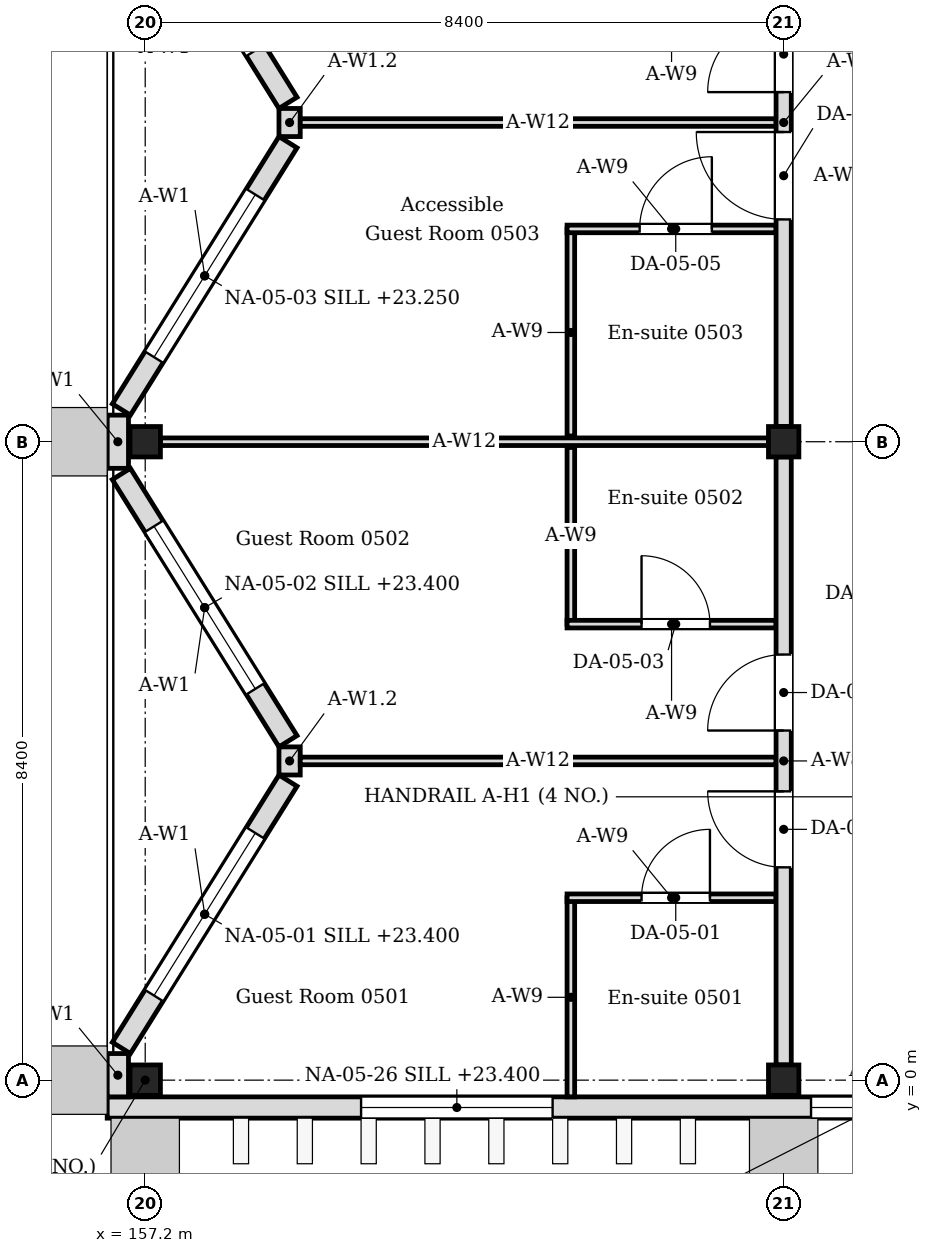
"""IFC4 building model, lengths in metres.
Left out: names, types, materials, properties, quantities, classifications, styles, units other than length and angle.
Written with IfcOpenShell. Run it as: python <this file> out.ifc"""

import sys

from ifc_helpers import new_model, si_unit, direction, frame, frame_2d, origin, origin_2d, place, context, subcontext, project, spatial, rectangle, i_section, extrude, element, fill, save


model = new_model("IFC4")
c1 = context("Model", 3, precision=1e-05, world=origin(), true_north=direction((0.0, 1.0)))
c2 = subcontext(c1, "Body", "Model", "MODEL_VIEW")
j1 = project(units=[si_unit("LENGTHUNIT", "METRE"), si_unit("PLANEANGLEUNIT", "RADIAN")], contexts=[c1])
p1 = place(None, origin())
s1 = spatial("IfcSite", under=j1, at=p1, CompositionType="ELEMENT")
p2 = place(p1, origin())
s2 = spatial("IfcBuilding", under=s1, at=p2, CompositionType="ELEMENT")
p3 = place(p2, frame((0.0, 0.0, 22.8)))
s3 = spatial("IfcBuildingStorey", under=s2, at=p3, CompositionType="ELEMENT", Elevation=22.8)
for number, where, z_axis, x_axis in (
    (1, (157.2, 0.0, 0.0), (0.0, 0.0, 1.0), (1.0, 0.0, 0.0)),
    (2, (157.2, 8.4, 0.0), (0.0, 0.0, 1.0), (1.0, 0.0, 0.0)),
    (3, (165.6, 0.0, 0.0), (0.0, 0.0, 1.0), (1.0, 0.0, 0.0)),
    (4, (165.6, 8.4, 0.0), (0.0, 0.0, 1.0), (1.0, 0.0, 0.0)),
):
    element("IfcColumn", number, at=place(p3, frame(where, z_axis=z_axis, x_axis=x_axis)), inside=s3, PredefinedType="COLUMN", context=c2, shape_type="SweptSolid", body=[
        extrude(i_section(OverallWidth=0.4, OverallDepth=0.4, WebThickness=0.013, FlangeThickness=0.021, FilletRadius=0.022, at=origin_2d()), origin(), (0.0, 0.0, 1.0), 4.2),
    ])
p4 = place(p3, frame((156.84, -0.22, 0.0), z_axis=(0.0, 0.0, 1.0), x_axis=(0.0, 1.0, 0.0)))
e5 = element("IfcWall", 5, at=p4, inside=s3, PredefinedType="SOLIDWALL", context=c2, shape_type="SweptSolid", body=[
    extrude(rectangle(XDim=0.57, YDim=0.28, at=frame_2d((0.285, 0.0))), origin(), (0.0, 0.0, 1.0), 4.05),
])
p5 = place(p3, frame((156.886, 0.424, 0.0), z_axis=(0.0, 0.0, 1.0), x_axis=(0.529018946142, 0.848610013271, 0.0)))
e6 = element("IfcWall", 6, at=p5, inside=s3, PredefinedType="SOLIDWALL", context=c2, shape_type="SweptSolid", body=[
    extrude(rectangle(XDim=4.144, YDim=0.28, at=frame_2d((2.072, 0.0))), origin(), (0.0, 0.0, 1.0), 4.05),
])
p6 = place(p5, frame((0.812, 0.0, 0.6)))
e7 = element("IfcOpeningElement", 7, at=p6, cuts=e6, PredefinedType="OPENING", context=c2, shape_type="SweptSolid", body=[
    extrude(rectangle(XDim=2.52, YDim=2.4, at=frame_2d((1.26, 1.2))), frame((0.0, 0.15, 0.0), z_axis=(0.0, -1.0, 0.0), x_axis=(1.0, 0.0, 0.0)), (0.0, 0.0, 1.0), 0.3),
])
p7 = place(p3, frame((159.079, 4.459, 0.0), z_axis=(0.0, 0.0, 1.0), x_axis=(-0.529018946142, 0.848610013271, 0.0)))
e8 = element("IfcWall", 8, at=p7, inside=s3, PredefinedType="SOLIDWALL", context=c2, shape_type="SweptSolid", body=[
    extrude(rectangle(XDim=4.144, YDim=0.28, at=frame_2d((2.072, 0.0))), origin(), (0.0, 0.0, 1.0), 4.05),
])
p8 = place(p7, frame((0.812, 0.0, 0.6)))
e9 = element("IfcOpeningElement", 9, at=p8, cuts=e8, PredefinedType="OPENING", context=c2, shape_type="SweptSolid", body=[
    extrude(rectangle(XDim=2.52, YDim=2.4, at=frame_2d((1.26, 1.2))), frame((0.0, 0.15, 0.0), z_axis=(0.0, -1.0, 0.0), x_axis=(1.0, 0.0, 0.0)), (0.0, 0.0, 1.0), 0.3),
])
p9 = place(p3, frame((159.1, 4.015, 0.0), z_axis=(0.0, 0.0, 1.0), x_axis=(0.0, 1.0, 0.0)))
e10 = element("IfcWall", 10, at=p9, inside=s3, PredefinedType="SOLIDWALL", context=c2, shape_type="SweptSolid", body=[
    extrude(rectangle(XDim=0.37, YDim=0.28, at=frame_2d((0.185, 0.0))), origin(), (0.0, 0.0, 1.0), 3.604),
])
p10 = place(p3, frame((156.84, 8.05, 0.0), z_axis=(0.0, 0.0, 1.0), x_axis=(0.0, 1.0, 0.0)))
e11 = element("IfcWall", 11, at=p10, inside=s3, PredefinedType="SOLIDWALL", context=c2, shape_type="SweptSolid", body=[
    extrude(rectangle(XDim=0.7, YDim=0.28, at=frame_2d((0.35, 0.0))), origin(), (0.0, 0.0, 1.0), 4.05),
])
p11 = place(p3, frame((156.886, 8.824, 0.0), z_axis=(0.0, 0.0, 1.0), x_axis=(0.529018946142, 0.848610013271, 0.0)))
e12 = element("IfcWall", 12, at=p11, inside=s3, PredefinedType="SOLIDWALL", context=c2, shape_type="SweptSolid", body=[
    extrude(rectangle(XDim=4.144, YDim=0.28, at=frame_2d((2.072, 0.0))), origin(), (0.0, 0.0, 1.0), 4.05),
])
p12 = place(p11, frame((0.812, 0.0, 0.45)))
e13 = element("IfcOpeningElement", 13, at=p12, cuts=e12, PredefinedType="OPENING", context=c2, shape_type="SweptSolid", body=[
    extrude(rectangle(XDim=2.52, YDim=2.1, at=frame_2d((1.26, 1.05))), frame((0.0, 0.15, 0.0), z_axis=(0.0, -1.0, 0.0), x_axis=(1.0, 0.0, 0.0)), (0.0, 0.0, 1.0), 0.3),
])
p13 = place(p3, frame((159.079, 12.859, 0.0), z_axis=(0.0, 0.0, 1.0), x_axis=(-0.528992500338, 0.848626498871, 0.0)))
e14 = element("IfcWall", 14, at=p13, inside=s3, PredefinedType="SOLIDWALL", context=c2, shape_type="SweptSolid", body=[
    extrude(rectangle(XDim=4.145, YDim=0.28, at=frame_2d((2.072, 0.0))), origin(), (0.0, 0.0, 1.0), 4.05),
])
p14 = place(p13, frame((0.812, 0.0, 0.6)))
e15 = element("IfcOpeningElement", 15, at=p14, cuts=e14, PredefinedType="OPENING", context=c2, shape_type="SweptSolid", body=[
    extrude(rectangle(XDim=2.52, YDim=2.4, at=frame_2d((1.26, 1.2))), frame((0.0, 0.15, 0.0), z_axis=(0.0, -1.0, 0.0), x_axis=(1.0, 0.0, 0.0)), (0.0, 0.0, 1.0), 0.3),
])
p15 = place(p3, frame((159.1, 12.415, 0.0), z_axis=(0.0, 0.0, 1.0), x_axis=(0.0, 1.0, 0.0)))
e16 = element("IfcWall", 16, at=p15, inside=s3, PredefinedType="SOLIDWALL", context=c2, shape_type="SweptSolid", body=[
    extrude(rectangle(XDim=0.37, YDim=0.28, at=frame_2d((0.185, 0.0))), origin(), (0.0, 0.0, 1.0), 3.604),
])
p16 = place(p3, frame((156.7, -0.36, 0.0), z_axis=(0.0, 0.0, 1.0), x_axis=(1.0, 0.0, 0.0)))
e17 = element("IfcWall", 17, at=p16, inside=s3, PredefinedType="SOLIDWALL", context=c2, shape_type="SweptSolid", body=[
    extrude(rectangle(XDim=20.2, YDim=0.28, at=frame_2d((10.1, 0.0))), origin(), (0.0, 0.0, 1.0), 4.05),
])
p17 = place(p16, frame((9.26, 0.0, 0.6)))
e18 = element("IfcOpeningElement", 18, at=p17, cuts=e17, PredefinedType="OPENING", context=c2, shape_type="SweptSolid", body=[
    extrude(rectangle(XDim=1.68, YDim=2.4, at=frame_2d((0.84, 1.2))), frame((0.0, 0.15, 0.0), z_axis=(0.0, -1.0, 0.0), x_axis=(1.0, 0.0, 0.0)), (0.0, 0.0, 1.0), 0.3),
])
p18 = place(p16, frame((3.34, 0.0, 0.6)))
e19 = element("IfcOpeningElement", 19, at=p18, cuts=e17, PredefinedType="OPENING", context=c2, shape_type="SweptSolid", body=[
    extrude(rectangle(XDim=2.52, YDim=2.4, at=frame_2d((1.26, 1.2))), frame((0.0, 0.15, 0.0), z_axis=(0.0, -1.0, 0.0), x_axis=(1.0, 0.0, 0.0)), (0.0, 0.0, 1.0), 0.3),
])
p19 = place(p3, frame((162.8, -0.22, 0.0), z_axis=(0.0, 0.0, 1.0), x_axis=(0.0, 1.0, 0.0)))
e20 = element("IfcWall", 20, at=p19, inside=s3, PredefinedType="PARTITIONING", context=c2, shape_type="SweptSolid", body=[
    extrude(rectangle(XDim=2.62, YDim=0.1, at=frame_2d((1.31, 0.0))), origin(), (0.0, 0.0, 1.0), 4.05),
])
p20 = place(p3, frame((162.75, 2.4, 0.0), z_axis=(0.0, 0.0, 1.0), x_axis=(1.0, 0.0, 0.0)))
e21 = element("IfcWall", 21, at=p20, inside=s3, PredefinedType="PARTITIONING", context=c2, shape_type="SweptSolid", body=[
    extrude(rectangle(XDim=2.75, YDim=0.1, at=frame_2d((1.375, 0.0))), origin(), (0.0, 0.0, 1.0), 4.05),
])
p21 = place(p20, frame((0.98, 0.0, 0.0)))
e22 = element("IfcOpeningElement", 22, at=p21, cuts=e21, PredefinedType="OPENING", context=c2, shape_type="SweptSolid", body=[
    extrude(rectangle(XDim=0.9, YDim=2.1, at=frame_2d((0.45, 1.05))), frame((0.0, 0.06, 0.0), z_axis=(0.0, -1.0, 0.0), x_axis=(1.0, 0.0, 0.0)), (0.0, 0.0, 1.0), 0.12),
])
p22 = place(p3, frame((162.8, 6.0, 0.0), z_axis=(0.0, 0.0, 1.0), x_axis=(0.0, 1.0, 0.0)))
e23 = element("IfcWall", 23, at=p22, inside=s3, PredefinedType="PARTITIONING", context=c2, shape_type="SweptSolid", body=[
    extrude(rectangle(XDim=2.325, YDim=0.1, at=frame_2d((1.163, 0.0))), origin(), (0.0, 0.0, 1.0), 4.05),
])
p23 = place(p3, frame((162.75, 6.0, 0.0), z_axis=(0.0, 0.0, 1.0), x_axis=(1.0, 0.0, 0.0)))
e24 = element("IfcWall", 24, at=p23, inside=s3, PredefinedType="PARTITIONING", context=c2, shape_type="SweptSolid", body=[
    extrude(rectangle(XDim=2.75, YDim=0.1, at=frame_2d((1.375, 0.0))), origin(), (0.0, 0.0, 1.0), 4.05),
])
p24 = place(p23, frame((0.98, 0.0, 0.0)))
e25 = element("IfcOpeningElement", 25, at=p24, cuts=e24, PredefinedType="OPENING", context=c2, shape_type="SweptSolid", body=[
    extrude(rectangle(XDim=0.9, YDim=2.1, at=frame_2d((0.45, 1.05))), frame((0.0, 0.06, 0.0), z_axis=(0.0, -1.0, 0.0), x_axis=(1.0, 0.0, 0.0)), (0.0, 0.0, 1.0), 0.12),
])
p25 = place(p3, frame((162.8, 8.475, 0.0), z_axis=(0.0, 0.0, 1.0), x_axis=(0.0, 1.0, 0.0)))
e26 = element("IfcWall", 26, at=p25, inside=s3, PredefinedType="PARTITIONING", context=c2, shape_type="SweptSolid", body=[
    extrude(rectangle(XDim=2.725, YDim=0.1, at=frame_2d((1.362, 0.0))), origin(), (0.0, 0.0, 1.0), 4.05),
])
p26 = place(p3, frame((162.75, 11.2, 0.0), z_axis=(0.0, 0.0, 1.0), x_axis=(1.0, 0.0, 0.0)))
e27 = element("IfcWall", 27, at=p26, inside=s3, PredefinedType="PARTITIONING", context=c2, shape_type="SweptSolid", body=[
    extrude(rectangle(XDim=2.75, YDim=0.1, at=frame_2d((1.375, 0.0))), origin(), (0.0, 0.0, 1.0), 4.05),
])
p27 = place(p26, frame((0.955, 0.0, 0.0)))
e28 = element("IfcOpeningElement", 28, at=p27, cuts=e27, PredefinedType="OPENING", context=c2, shape_type="SweptSolid", body=[
    extrude(rectangle(XDim=0.95, YDim=2.1, at=frame_2d((0.475, 1.05))), frame((0.0, 0.06, 0.0), z_axis=(0.0, -1.0, 0.0), x_axis=(1.0, 0.0, 0.0)), (0.0, 0.0, 1.0), 0.12),
])
p28 = place(p3, frame((157.4, 8.4, 0.0), z_axis=(0.0, 0.0, 1.0), x_axis=(1.0, 0.0, 0.0)))
e29 = element("IfcWall", 29, at=p28, inside=s3, PredefinedType="PARTITIONING", context=c2, shape_type="SweptSolid", body=[
    extrude(rectangle(XDim=8.0, YDim=0.1, at=frame_2d((4.0, 0.0))), origin(), (0.0, 0.0, 1.0), 3.604),
])
for number, where, z_axis, x_axis in (
    (30, (159.24, 4.2, 0.0), (0.0, 0.0, 1.0), (1.0, 0.0, 0.0)),
    (31, (159.24, 12.6, 0.0), (0.0, 0.0, 1.0), (1.0, 0.0, 0.0)),
):
    element("IfcWall", number, at=place(p3, frame(where, z_axis=z_axis, x_axis=x_axis)), inside=s3, PredefinedType="PARTITIONING", context=c2, shape_type="SweptSolid", body=[
        extrude(rectangle(XDim=6.26, YDim=0.1, at=frame_2d((3.13, 0.0))), origin(), (0.0, 0.0, 1.0), 3.604),
    ])
p29 = place(p3, frame((165.6, 0.2, 0.0), z_axis=(0.0, 0.0, 1.0), x_axis=(0.0, 1.0, 0.0)))
e32 = element("IfcWall", 32, at=p29, inside=s3, PredefinedType="PARTITIONING", context=c2, shape_type="SweptSolid", body=[
    extrude(rectangle(XDim=8.0, YDim=0.2, at=frame_2d((4.0, 0.0))), origin(), (0.0, 0.0, 1.0), 3.45),
])
p30 = place(p29, frame((2.6, 0.0, 0.0)))
e33 = element("IfcOpeningElement", 33, at=p30, cuts=e32, PredefinedType="OPENING", context=c2, shape_type="SweptSolid", body=[
    extrude(rectangle(XDim=1.0, YDim=2.4, at=frame_2d((0.5, 1.2))), frame((0.0, 0.11, 0.0), z_axis=(0.0, -1.0, 0.0), x_axis=(1.0, 0.0, 0.0)), (0.0, 0.0, 1.0), 0.22),
])
p31 = place(p29, frame((4.4, 0.0, 0.0)))
e34 = element("IfcOpeningElement", 34, at=p31, cuts=e32, PredefinedType="OPENING", context=c2, shape_type="SweptSolid", body=[
    extrude(rectangle(XDim=1.0, YDim=2.4, at=frame_2d((0.5, 1.2))), frame((0.0, 0.11, 0.0), z_axis=(0.0, -1.0, 0.0), x_axis=(1.0, 0.0, 0.0)), (0.0, 0.0, 1.0), 0.22),
])
p32 = place(p3, frame((165.6, 8.6, 0.0), z_axis=(0.0, 0.0, 1.0), x_axis=(0.0, 1.0, 0.0)))
e35 = element("IfcWall", 35, at=p32, inside=s3, PredefinedType="PARTITIONING", context=c2, shape_type="SweptSolid", body=[
    extrude(rectangle(XDim=8.0, YDim=0.2, at=frame_2d((4.0, 0.0))), origin(), (0.0, 0.0, 1.0), 3.45),
])
p33 = place(p32, frame((2.725, 0.0, 0.0)))
e36 = element("IfcOpeningElement", 36, at=p33, cuts=e35, PredefinedType="OPENING", context=c2, shape_type="SweptSolid", body=[
    extrude(rectangle(XDim=1.15, YDim=2.1, at=frame_2d((0.575, 1.05))), frame((0.0, 0.11, 0.0), z_axis=(0.0, -1.0, 0.0), x_axis=(1.0, 0.0, 0.0)), (0.0, 0.0, 1.0), 0.22),
])
p34 = place(p32, frame((4.4, 0.0, 0.0)))
e37 = element("IfcOpeningElement", 37, at=p34, cuts=e35, PredefinedType="OPENING", context=c2, shape_type="SweptSolid", body=[
    extrude(rectangle(XDim=1.0, YDim=2.4, at=frame_2d((0.5, 1.2))), frame((0.0, 0.11, 0.0), z_axis=(0.0, -1.0, 0.0), x_axis=(1.0, 0.0, 0.0)), (0.0, 0.0, 1.0), 0.22),
])
p35 = place(p6, origin())
e38 = element("IfcWindow", 38, at=p35, inside=s3, PartitioningType="SINGLE_PANEL", PredefinedType="WINDOW", context=c2, shape_type="SweptSolid", body=[
    extrude(rectangle(XDim=2.52, YDim=2.4, at=frame_2d((1.26, 1.2))), frame((0.0, 0.03, 0.0), z_axis=(0.0, -1.0, 0.0), x_axis=(1.0, 0.0, 0.0)), (0.0, 0.0, 1.0), 0.06),
])
fill(e7, e38)
p36 = place(p8, origin())
e39 = element("IfcWindow", 39, at=p36, inside=s3, PartitioningType="SINGLE_PANEL", PredefinedType="WINDOW", context=c2, shape_type="SweptSolid", body=[
    extrude(rectangle(XDim=2.52, YDim=2.4, at=frame_2d((1.26, 1.2))), frame((0.0, 0.03, 0.0), z_axis=(0.0, -1.0, 0.0), x_axis=(1.0, 0.0, 0.0)), (0.0, 0.0, 1.0), 0.06),
])
fill(e9, e39)
p37 = place(p12, origin())
e40 = element("IfcWindow", 40, at=p37, inside=s3, PartitioningType="SINGLE_PANEL", PredefinedType="WINDOW", context=c2, shape_type="SweptSolid", body=[
    extrude(rectangle(XDim=2.52, YDim=2.1, at=frame_2d((1.26, 1.05))), frame((0.0, 0.03, 0.0), z_axis=(0.0, -1.0, 0.0), x_axis=(1.0, 0.0, 0.0)), (0.0, 0.0, 1.0), 0.06),
])
fill(e13, e40)
p38 = place(p17, origin())
e41 = element("IfcWindow", 41, at=p38, inside=s3, PartitioningType="SINGLE_PANEL", PredefinedType="WINDOW", context=c2, shape_type="SweptSolid", body=[
    extrude(rectangle(XDim=1.68, YDim=2.4, at=frame_2d((0.84, 1.2))), frame((0.0, 0.03, 0.0), z_axis=(0.0, -1.0, 0.0), x_axis=(1.0, 0.0, 0.0)), (0.0, 0.0, 1.0), 0.06),
])
fill(e18, e41)
p39 = place(p18, origin())
e42 = element("IfcWindow", 42, at=p39, inside=s3, PartitioningType="SINGLE_PANEL", PredefinedType="WINDOW", context=c2, shape_type="SweptSolid", body=[
    extrude(rectangle(XDim=2.52, YDim=2.4, at=frame_2d((1.26, 1.2))), frame((0.0, 0.03, 0.0), z_axis=(0.0, -1.0, 0.0), x_axis=(1.0, 0.0, 0.0)), (0.0, 0.0, 1.0), 0.06),
])
fill(e19, e42)
p40 = place(p21, origin())
e43 = element("IfcDoor", 43, at=p40, inside=s3, OperationType="SINGLE_SWING_RIGHT", PredefinedType="DOOR", context=c2, shape_type="SweptSolid", body=[
    extrude(rectangle(XDim=0.9, YDim=2.1, at=frame_2d((0.45, 1.05))), frame((0.0, 0.025, 0.0), z_axis=(0.0, -1.0, 0.0), x_axis=(1.0, 0.0, 0.0)), (0.0, 0.0, 1.0), 0.05),
])
fill(e22, e43)
p41 = place(p30, origin())
e44 = element("IfcDoor", 44, at=p41, inside=s3, OperationType="SINGLE_SWING_RIGHT", PredefinedType="DOOR", context=c2, shape_type="SweptSolid", body=[
    extrude(rectangle(XDim=1.0, YDim=2.4, at=frame_2d((0.5, 1.2))), frame((0.0, 0.025, 0.0), z_axis=(0.0, -1.0, 0.0), x_axis=(1.0, 0.0, 0.0)), (0.0, 0.0, 1.0), 0.05),
])
fill(e33, e44)
p42 = place(p24, origin())
e45 = element("IfcDoor", 45, at=p42, inside=s3, OperationType="SINGLE_SWING_LEFT", PredefinedType="DOOR", context=c2, shape_type="SweptSolid", body=[
    extrude(rectangle(XDim=0.9, YDim=2.1, at=frame_2d((0.45, 1.05))), frame((0.0, 0.025, 0.0), z_axis=(0.0, -1.0, 0.0), x_axis=(1.0, 0.0, 0.0)), (0.0, 0.0, 1.0), 0.05),
])
fill(e25, e45)
p43 = place(p31, origin())
e46 = element("IfcDoor", 46, at=p43, inside=s3, OperationType="SINGLE_SWING_LEFT", PredefinedType="DOOR", context=c2, shape_type="SweptSolid", body=[
    extrude(rectangle(XDim=1.0, YDim=2.4, at=frame_2d((0.5, 1.2))), frame((0.0, 0.025, 0.0), z_axis=(0.0, -1.0, 0.0), x_axis=(1.0, 0.0, 0.0)), (0.0, 0.0, 1.0), 0.05),
])
fill(e34, e46)
p44 = place(p27, origin())
e47 = element("IfcDoor", 47, at=p44, inside=s3, OperationType="SINGLE_SWING_RIGHT", PredefinedType="DOOR", context=c2, shape_type="SweptSolid", body=[
    extrude(rectangle(XDim=0.95, YDim=2.1, at=frame_2d((0.475, 1.05))), frame((0.0, 0.025, 0.0), z_axis=(0.0, -1.0, 0.0), x_axis=(1.0, 0.0, 0.0)), (0.0, 0.0, 1.0), 0.05),
])
fill(e28, e47)
p45 = place(p33, origin())
e48 = element("IfcDoor", 48, at=p45, inside=s3, OperationType="SINGLE_SWING_RIGHT", PredefinedType="DOOR", context=c2, shape_type="SweptSolid", body=[
    extrude(rectangle(XDim=1.15, YDim=2.1, at=frame_2d((0.575, 1.05))), frame((0.0, 0.025, 0.0), z_axis=(0.0, -1.0, 0.0), x_axis=(1.0, 0.0, 0.0)), (0.0, 0.0, 1.0), 0.05),
])
fill(e36, e48)
p46 = place(p34, origin())
e49 = element("IfcDoor", 49, at=p46, inside=s3, OperationType="SINGLE_SWING_LEFT", PredefinedType="DOOR", context=c2, shape_type="SweptSolid", body=[
    extrude(rectangle(XDim=1.0, YDim=2.4, at=frame_2d((0.5, 1.2))), frame((0.0, 0.025, 0.0), z_axis=(0.0, -1.0, 0.0), x_axis=(1.0, 0.0, 0.0)), (0.0, 0.0, 1.0), 0.05),
])
fill(e37, e49)
save(model, sys.argv[1])
